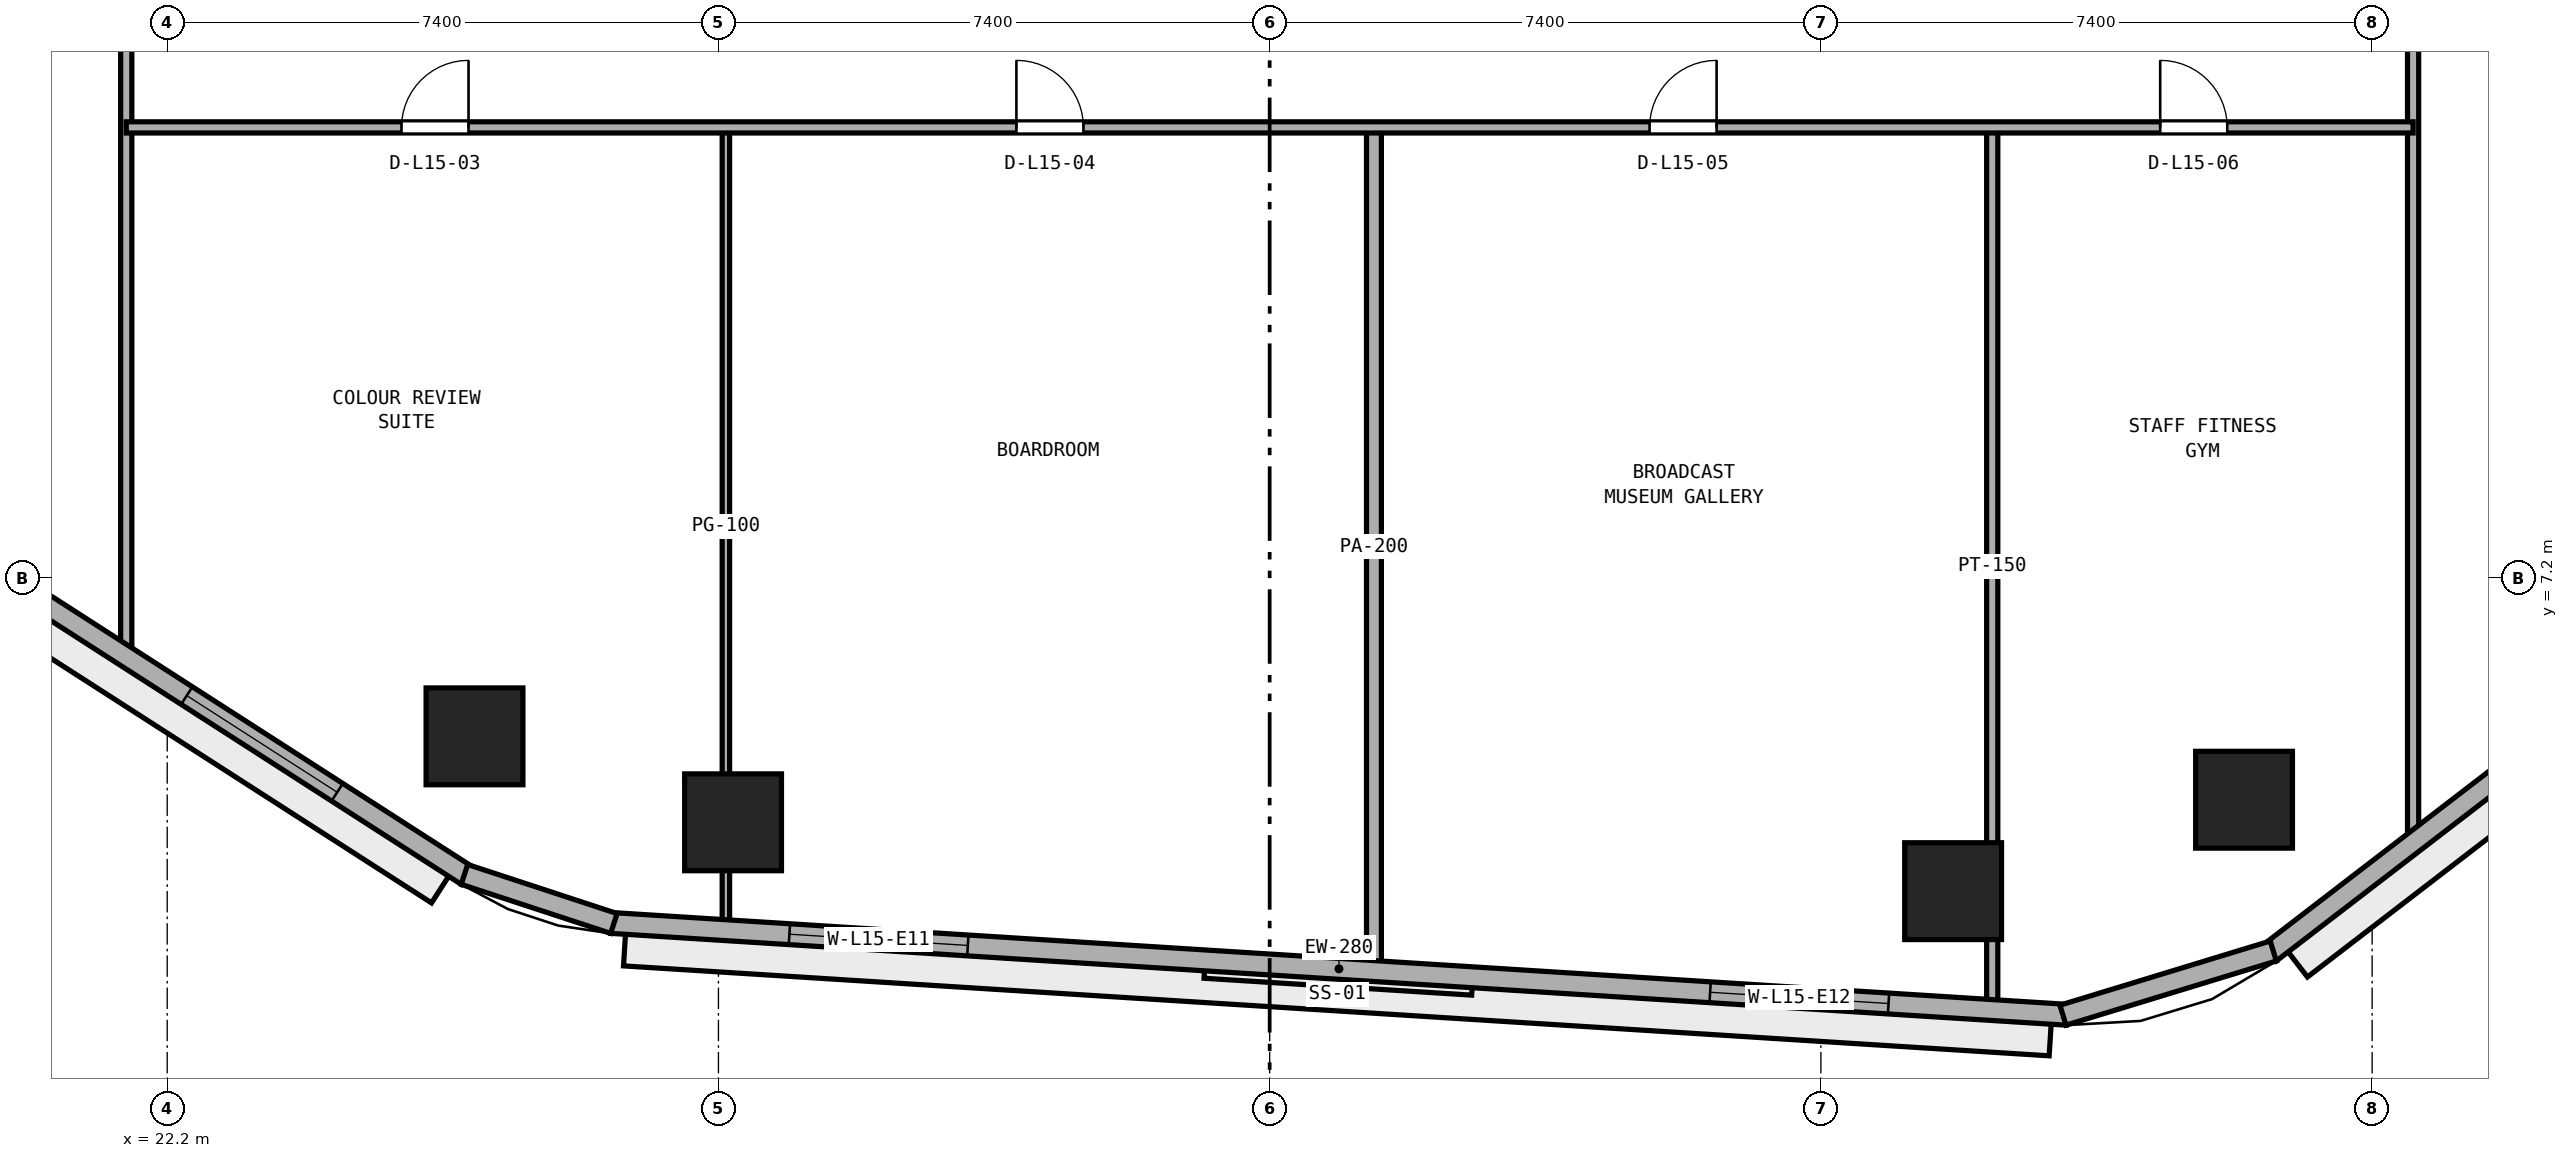
"""IFC4 building model, lengths in metres.
Left out: names, types, materials, properties, quantities, classifications, styles, units other than length and angle.
Written with IfcOpenShell. Run it as: python <this file> out.ifc"""

import sys

from ifc_helpers import new_model, si_unit, direction, frame, frame_2d, origin, origin_2d, place, context, subcontext, project, spatial, rectangle, extrude, element, fill, save


model = new_model("IFC4")
c1 = context("Model", 3, precision=1e-05, world=origin(), true_north=direction((0.0, 1.0)))
c2 = subcontext(c1, "Body", "Model", "MODEL_VIEW")
j1 = project(units=[si_unit("LENGTHUNIT", "METRE"), si_unit("PLANEANGLEUNIT", "RADIAN")], contexts=[c1])
p1 = place(None, origin())
s1 = spatial("IfcSite", under=j1, at=p1, CompositionType="ELEMENT")
p2 = place(p1, origin())
s2 = spatial("IfcBuilding", under=s1, at=p2, CompositionType="ELEMENT")
p3 = place(p2, frame((0.0, 0.0, 63.0)))
s3 = spatial("IfcBuildingStorey", under=s2, at=p3, CompositionType="ELEMENT", Elevation=63.0)
for number, where, z_axis, x_axis in (
    (1, (29.796, 3.922, 0.0), (0.0, 0.0, 1.0), (1.0, 0.0, 0.0)),
    (2, (46.175, 2.998, 0.0), (0.0, 0.0, 1.0), (1.0, 0.0, 0.0)),
    (3, (50.081, 4.225, 0.0), (0.0, 0.0, 1.0), (1.0, 0.0, 0.0)),
    (4, (26.325, 5.076, 0.0), (0.0, 0.0, 1.0), (1.0, 0.0, 0.0)),
):
    element("IfcColumn", number, at=place(p3, frame(where, z_axis=z_axis, x_axis=x_axis)), inside=s3, PredefinedType="COLUMN", context=c2, shape_type="SweptSolid", body=[
        extrude(rectangle(XDim=1.3, YDim=1.3, at=origin_2d()), origin(), (0.0, 0.0, 1.0), 3.8),
    ])
p4 = place(p3, frame((52.35, 3.611, 0.0), z_axis=(0.0, 0.0, 1.0), x_axis=(0.0, 1.0, 0.0)))
e5 = element("IfcWall", 5, at=p4, inside=s3, PredefinedType="PARTITIONING", context=c2, shape_type="SweptSolid", body=[
    extrude(rectangle(XDim=43.441, YDim=0.15, at=frame_2d((21.72, 0.0))), origin(), (0.0, 0.0, 1.0), 3.525),
])
p5 = place(p4, frame((12.364, 0.0, 0.0)))
e6 = element("IfcOpeningElement", 6, at=p5, cuts=e5, PredefinedType="OPENING", context=c2, shape_type="SweptSolid", body=[
    extrude(rectangle(XDim=0.9, YDim=2.1, at=frame_2d((0.45, 1.05))), frame((0.0, 0.085, 0.0), z_axis=(0.0, -1.0, 0.0), x_axis=(1.0, 0.0, 0.0)), (0.0, 0.0, 1.0), 0.17),
])
p6 = place(p4, frame((18.889, 0.0, 0.0)))
e7 = element("IfcOpeningElement", 7, at=p6, cuts=e5, PredefinedType="OPENING", context=c2, shape_type="SweptSolid", body=[
    extrude(rectangle(XDim=1.0, YDim=2.12, at=frame_2d((0.5, 1.06))), frame((0.0, 0.085, 0.0), z_axis=(0.0, -1.0, 0.0), x_axis=(1.0, 0.0, 0.0)), (0.0, 0.0, 1.0), 0.17),
])
p7 = place(p4, frame((25.689, 0.0, 0.0)))
e8 = element("IfcOpeningElement", 8, at=p7, cuts=e5, PredefinedType="OPENING", context=c2, shape_type="SweptSolid", body=[
    extrude(rectangle(XDim=1.0, YDim=2.12, at=frame_2d((0.5, 1.06))), frame((0.0, 0.085, 0.0), z_axis=(0.0, -1.0, 0.0), x_axis=(1.0, 0.0, 0.0)), (0.0, 0.0, 1.0), 0.17),
])
p8 = place(p4, frame((31.114, 0.0, 0.0)))
e9 = element("IfcOpeningElement", 9, at=p8, cuts=e5, PredefinedType="OPENING", context=c2, shape_type="SweptSolid", body=[
    extrude(rectangle(XDim=0.9, YDim=2.1, at=frame_2d((0.45, 1.05))), frame((0.0, 0.085, 0.0), z_axis=(0.0, -1.0, 0.0), x_axis=(1.0, 0.0, 0.0)), (0.0, 0.0, 1.0), 0.17),
])
p9 = place(p3, frame((46.7, 1.467, 0.0), z_axis=(0.0, 0.0, 1.0), x_axis=(0.0, 1.0, 0.0)))
e10 = element("IfcWall", 10, at=p9, inside=s3, PredefinedType="PARTITIONING", context=c2, shape_type="SweptSolid", body=[
    extrude(rectangle(XDim=11.783, YDim=0.15, at=frame_2d((5.892, 0.0))), origin(), (0.0, 0.0, 1.0), 3.525),
])
p10 = place(p3, frame((38.4, 1.99, 0.0), z_axis=(0.0, 0.0, 1.0), x_axis=(0.0, 1.0, 0.0)))
e11 = element("IfcWall", 11, at=p10, inside=s3, PredefinedType="PARTITIONING", context=c2, shape_type="SweptSolid", body=[
    extrude(rectangle(XDim=11.26, YDim=0.2, at=frame_2d((5.63, 0.0))), origin(), (0.0, 0.0, 1.0), 3.525),
])
p11 = place(p3, frame((29.7, 2.539, 0.0), z_axis=(0.0, 0.0, 1.0), x_axis=(0.0, 1.0, 0.0)))
e12 = element("IfcWall", 12, at=p11, inside=s3, PredefinedType="PARTITIONING", context=c2, shape_type="SweptSolid", body=[
    extrude(rectangle(XDim=10.711, YDim=0.1, at=frame_2d((5.355, 0.0))), origin(), (0.0, 0.0, 1.0), 2.908),
])
p12 = place(p3, frame((21.65, 6.119, 0.0), z_axis=(0.0, 0.0, 1.0), x_axis=(0.0, 1.0, 0.0)))
e13 = element("IfcWall", 13, at=p12, inside=s3, PredefinedType="PARTITIONING", context=c2, shape_type="SweptSolid", body=[
    extrude(rectangle(XDim=37.884, YDim=0.15, at=frame_2d((18.942, 0.0))), origin(), (0.0, 0.0, 1.0), 3.525),
])
p13 = place(p12, frame((13.556, 0.0, 0.0)))
e14 = element("IfcOpeningElement", 14, at=p13, cuts=e13, PredefinedType="OPENING", context=c2, shape_type="SweptSolid", body=[
    extrude(rectangle(XDim=0.9, YDim=2.1, at=frame_2d((0.45, 1.05))), frame((0.0, 0.085, 0.0), z_axis=(0.0, -1.0, 0.0), x_axis=(1.0, 0.0, 0.0)), (0.0, 0.0, 1.0), 0.17),
])
p14 = place(p12, frame((25.506, 0.0, 0.0)))
e15 = element("IfcOpeningElement", 15, at=p14, cuts=e13, PredefinedType="OPENING", context=c2, shape_type="SweptSolid", body=[
    extrude(rectangle(XDim=0.9, YDim=2.1, at=frame_2d((0.45, 1.05))), frame((0.0, 0.085, 0.0), z_axis=(0.0, -1.0, 0.0), x_axis=(1.0, 0.0, 0.0)), (0.0, 0.0, 1.0), 0.17),
])
p15 = place(p3, frame((21.65, 13.25, 0.0), z_axis=(0.0, 0.0, 1.0), x_axis=(1.0, 0.0, 0.0)))
e16 = element("IfcWall", 16, at=p15, inside=s3, PredefinedType="PARTITIONING", context=c2, shape_type="SweptSolid", body=[
    extrude(rectangle(XDim=30.7, YDim=0.15, at=frame_2d((15.35, 0.0))), origin(), (0.0, 0.0, 1.0), 3.525),
])
p16 = place(p15, frame((3.695, 0.0, 0.0)))
e17 = element("IfcOpeningElement", 17, at=p16, cuts=e16, PredefinedType="OPENING", context=c2, shape_type="SweptSolid", body=[
    extrude(rectangle(XDim=0.9, YDim=2.1, at=frame_2d((0.45, 1.05))), frame((0.0, 0.085, 0.0), z_axis=(0.0, -1.0, 0.0), x_axis=(1.0, 0.0, 0.0)), (0.0, 0.0, 1.0), 0.17),
])
p17 = place(p15, frame((11.95, 0.0, 0.0)))
e18 = element("IfcOpeningElement", 18, at=p17, cuts=e16, PredefinedType="OPENING", context=c2, shape_type="SweptSolid", body=[
    extrude(rectangle(XDim=0.9, YDim=2.1, at=frame_2d((0.45, 1.05))), frame((0.0, 0.085, 0.0), z_axis=(0.0, -1.0, 0.0), x_axis=(1.0, 0.0, 0.0)), (0.0, 0.0, 1.0), 0.17),
])
p18 = place(p15, frame((20.45, 0.0, 0.0)))
e19 = element("IfcOpeningElement", 19, at=p18, cuts=e16, PredefinedType="OPENING", context=c2, shape_type="SweptSolid", body=[
    extrude(rectangle(XDim=0.9, YDim=2.1, at=frame_2d((0.45, 1.05))), frame((0.0, 0.085, 0.0), z_axis=(0.0, -1.0, 0.0), x_axis=(1.0, 0.0, 0.0)), (0.0, 0.0, 1.0), 0.17),
])
p19 = place(p15, frame((27.305, 0.0, 0.0)))
e20 = element("IfcOpeningElement", 20, at=p19, cuts=e16, PredefinedType="OPENING", context=c2, shape_type="SweptSolid", body=[
    extrude(rectangle(XDim=0.9, YDim=2.1, at=frame_2d((0.45, 1.05))), frame((0.0, 0.085, 0.0), z_axis=(0.0, -1.0, 0.0), x_axis=(1.0, 0.0, 0.0)), (0.0, 0.0, 1.0), 0.17),
])
p20 = place(p3, frame((28.161, 2.571, 0.0), z_axis=(0.0, 0.0, 1.0), x_axis=(0.998017288298, -0.06294038654, 0.0)))
e21 = element("IfcWall", 21, at=p20, inside=s3, PredefinedType="STANDARD", context=c2, shape_type="SweptSolid", body=[
    extrude(rectangle(XDim=19.577, YDim=0.28, at=frame_2d((9.789, 0.0))), origin(), (0.0, 0.0, 1.0), 3.525),
])
p21 = place(p20, frame((2.396, 0.0, 0.9)))
e22 = element("IfcOpeningElement", 22, at=p21, cuts=e21, PredefinedType="OPENING", context=c2, shape_type="SweptSolid", body=[
    extrude(rectangle(XDim=2.4, YDim=1.75, at=frame_2d((1.2, 0.875))), frame((0.0, 0.15, 0.0), z_axis=(0.0, -1.0, 0.0), x_axis=(1.0, 0.0, 0.0)), (0.0, 0.0, 1.0), 0.3),
])
p22 = place(p20, frame((14.781, 0.0, 0.9)))
e23 = element("IfcOpeningElement", 23, at=p22, cuts=e21, PredefinedType="OPENING", context=c2, shape_type="SweptSolid", body=[
    extrude(rectangle(XDim=2.4, YDim=1.75, at=frame_2d((1.2, 0.875))), frame((0.0, 0.15, 0.0), z_axis=(0.0, -1.0, 0.0), x_axis=(1.0, 0.0, 0.0)), (0.0, 0.0, 1.0), 0.3),
])
p23 = place(p3, frame((50.429, 2.172, 0.0), z_axis=(0.0, 0.0, 1.0), x_axis=(0.792937466367, 0.609303023488, 0.0)))
e24 = element("IfcWall", 24, at=p23, inside=s3, PredefinedType="STANDARD", context=c2, shape_type="SweptSolid", body=[
    extrude(rectangle(XDim=17.713, YDim=0.28, at=frame_2d((8.856, 0.0))), origin(), (0.0, 0.0, 1.0), 3.525),
])
p24 = place(p23, frame((7.656, 0.0, 0.9)))
e25 = element("IfcOpeningElement", 25, at=p24, cuts=e24, PredefinedType="OPENING", context=c2, shape_type="SweptSolid", body=[
    extrude(rectangle(XDim=2.4, YDim=1.75, at=frame_2d((1.2, 0.875))), frame((0.0, 0.15, 0.0), z_axis=(0.0, -1.0, 0.0), x_axis=(1.0, 0.0, 0.0)), (0.0, 0.0, 1.0), 0.3),
])
p25 = place(p23, frame((13.227, 0.0, 0.9)))
e26 = element("IfcOpeningElement", 26, at=p25, cuts=e24, PredefinedType="OPENING", context=c2, shape_type="SweptSolid", body=[
    extrude(rectangle(XDim=2.4, YDim=1.75, at=frame_2d((1.2, 0.875))), frame((0.0, 0.15, 0.0), z_axis=(0.0, -1.0, 0.0), x_axis=(1.0, 0.0, 0.0)), (0.0, 0.0, 1.0), 0.3),
])
p26 = place(p3, frame((11.405, 12.728, 0.0), z_axis=(0.0, 0.0, 1.0), x_axis=(0.841304564637, -0.540561402175, 0.0)))
e27 = element("IfcWall", 27, at=p26, inside=s3, PredefinedType="STANDARD", context=c2, shape_type="SweptSolid", body=[
    extrude(rectangle(XDim=17.612, YDim=0.28, at=frame_2d((8.806, 0.0))), origin(), (0.0, 0.0, 1.0), 3.525),
])
p27 = place(p26, frame((2.069, 0.0, 0.9)))
e28 = element("IfcOpeningElement", 28, at=p27, cuts=e27, PredefinedType="OPENING", context=c2, shape_type="SweptSolid", body=[
    extrude(rectangle(XDim=2.4, YDim=1.75, at=frame_2d((1.2, 0.875))), frame((0.0, 0.15, 0.0), z_axis=(0.0, -1.0, 0.0), x_axis=(1.0, 0.0, 0.0)), (0.0, 0.0, 1.0), 0.3),
])
p28 = place(p26, frame((7.606, 0.0, 0.9)))
e29 = element("IfcOpeningElement", 29, at=p28, cuts=e27, PredefinedType="OPENING", context=c2, shape_type="SweptSolid", body=[
    extrude(rectangle(XDim=2.4, YDim=1.75, at=frame_2d((1.2, 0.875))), frame((0.0, 0.15, 0.0), z_axis=(0.0, -1.0, 0.0), x_axis=(1.0, 0.0, 0.0)), (0.0, 0.0, 1.0), 0.3),
])
p29 = place(p26, frame((13.143, 0.0, 0.9)))
e30 = element("IfcOpeningElement", 30, at=p29, cuts=e27, PredefinedType="OPENING", context=c2, shape_type="SweptSolid", body=[
    extrude(rectangle(XDim=2.4, YDim=1.75, at=frame_2d((1.2, 0.875))), frame((0.0, 0.15, 0.0), z_axis=(0.0, -1.0, 0.0), x_axis=(1.0, 0.0, 0.0)), (0.0, 0.0, 1.0), 0.3),
])
p30 = place(p3, frame((47.65, 1.333, 0.0), z_axis=(0.0, 0.0, 1.0), x_axis=(0.956461287977, 0.291859220516, 0.0)))
e31 = element("IfcWall", 31, at=p30, inside=s3, PredefinedType="STANDARD", context=c2, shape_type="SweptSolid", body=[
    extrude(rectangle(XDim=2.952, YDim=0.28, at=frame_2d((1.476, 0.0))), origin(), (0.0, 0.0, 1.0), 3.525),
])
p31 = place(p3, frame((26.19, 3.223, 0.0), z_axis=(0.0, 0.0, 1.0), x_axis=(0.95016442175, -0.311749212734, 0.0)))
e32 = element("IfcWall", 32, at=p31, inside=s3, PredefinedType="STANDARD", context=c2, shape_type="SweptSolid", body=[
    extrude(rectangle(XDim=2.111, YDim=0.28, at=frame_2d((1.056, 0.0))), origin(), (0.0, 0.0, 1.0), 3.525),
])
p32 = place(p16, origin())
e33 = element("IfcDoor", 33, at=p32, inside=s3, OperationType="SINGLE_SWING_RIGHT", PredefinedType="DOOR", context=c2, shape_type="SweptSolid", body=[
    extrude(rectangle(XDim=0.9, YDim=2.1, at=frame_2d((0.45, 1.05))), frame((0.0, 0.025, 0.0), z_axis=(0.0, -1.0, 0.0), x_axis=(1.0, 0.0, 0.0)), (0.0, 0.0, 1.0), 0.05),
])
fill(e17, e33)
p33 = place(p17, origin())
e34 = element("IfcDoor", 34, at=p33, inside=s3, OperationType="SINGLE_SWING_LEFT", PredefinedType="DOOR", context=c2, shape_type="SweptSolid", body=[
    extrude(rectangle(XDim=0.9, YDim=2.1, at=frame_2d((0.45, 1.05))), frame((0.0, 0.025, 0.0), z_axis=(0.0, -1.0, 0.0), x_axis=(1.0, 0.0, 0.0)), (0.0, 0.0, 1.0), 0.05),
])
fill(e18, e34)
p34 = place(p18, origin())
e35 = element("IfcDoor", 35, at=p34, inside=s3, OperationType="SINGLE_SWING_RIGHT", PredefinedType="DOOR", context=c2, shape_type="SweptSolid", body=[
    extrude(rectangle(XDim=0.9, YDim=2.1, at=frame_2d((0.45, 1.05))), frame((0.0, 0.025, 0.0), z_axis=(0.0, -1.0, 0.0), x_axis=(1.0, 0.0, 0.0)), (0.0, 0.0, 1.0), 0.05),
])
fill(e19, e35)
p35 = place(p19, origin())
e36 = element("IfcDoor", 36, at=p35, inside=s3, OperationType="SINGLE_SWING_LEFT", PredefinedType="DOOR", context=c2, shape_type="SweptSolid", body=[
    extrude(rectangle(XDim=0.9, YDim=2.1, at=frame_2d((0.45, 1.05))), frame((0.0, 0.025, 0.0), z_axis=(0.0, -1.0, 0.0), x_axis=(1.0, 0.0, 0.0)), (0.0, 0.0, 1.0), 0.05),
])
fill(e20, e36)
p36 = place(p21, origin())
e37 = element("IfcWindow", 37, at=p36, inside=s3, PartitioningType="SINGLE_PANEL", PredefinedType="WINDOW", context=c2, shape_type="SweptSolid", body=[
    extrude(rectangle(XDim=2.4, YDim=1.75, at=frame_2d((1.2, 0.875))), frame((0.0, 0.03, 0.0), z_axis=(0.0, -1.0, 0.0), x_axis=(1.0, 0.0, 0.0)), (0.0, 0.0, 1.0), 0.06),
])
fill(e22, e37)
p37 = place(p22, origin())
e38 = element("IfcWindow", 38, at=p37, inside=s3, PartitioningType="SINGLE_PANEL", PredefinedType="WINDOW", context=c2, shape_type="SweptSolid", body=[
    extrude(rectangle(XDim=2.4, YDim=1.75, at=frame_2d((1.2, 0.875))), frame((0.0, 0.03, 0.0), z_axis=(0.0, -1.0, 0.0), x_axis=(1.0, 0.0, 0.0)), (0.0, 0.0, 1.0), 0.06),
])
fill(e23, e38)
p38 = place(p29, origin())
e39 = element("IfcWindow", 39, at=p38, inside=s3, PartitioningType="SINGLE_PANEL", PredefinedType="WINDOW", context=c2, shape_type="SweptSolid", body=[
    extrude(rectangle(XDim=2.4, YDim=1.75, at=frame_2d((1.2, 0.875))), frame((0.0, 0.03, 0.0), z_axis=(0.0, -1.0, 0.0), x_axis=(1.0, 0.0, 0.0)), (0.0, 0.0, 1.0), 0.06),
])
fill(e30, e39)
save(model, sys.argv[1])
